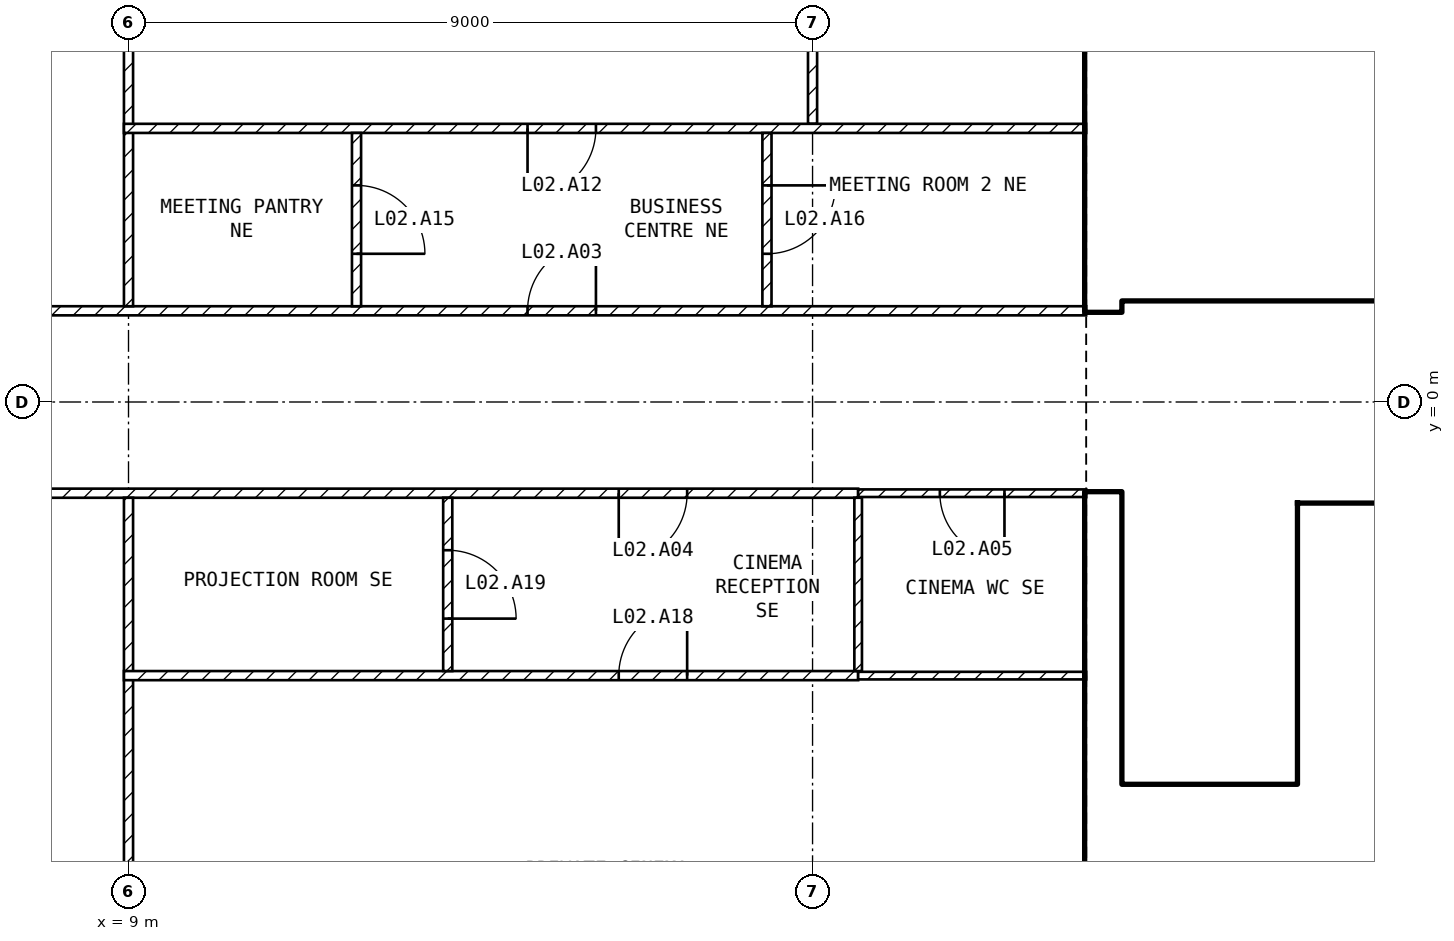
"""IFC4 building model, lengths in metres.
Left out: names, types, materials, properties, quantities, classifications, styles, units other than length and angle.
Written with IfcOpenShell. Run it as: python <this file> out.ifc"""

import sys

from ifc_helpers import new_model, si_unit, direction, frame, frame_2d, origin, place, context, subcontext, project, spatial, rectangle, extrude, element, fill, save


model = new_model("IFC4")
c1 = context("Model", 3, precision=1e-05, world=origin(), true_north=direction((0.0, 1.0)))
c2 = subcontext(c1, "Body", "Model", "MODEL_VIEW")
j1 = project(units=[si_unit("LENGTHUNIT", "METRE"), si_unit("PLANEANGLEUNIT", "RADIAN")], contexts=[c1])
p1 = place(None, origin())
s1 = spatial("IfcSite", under=j1, at=p1, CompositionType="ELEMENT")
p2 = place(p1, origin())
s2 = spatial("IfcBuilding", under=s1, at=p2, CompositionType="ELEMENT")
p3 = place(p2, frame((0.0, 0.0, 21.0)))
s3 = spatial("IfcBuildingStorey", under=s2, at=p3, CompositionType="ELEMENT", Elevation=21.0)
for number, where, z_axis, x_axis in (
    (1, (21.825, -8.1, 0.0), (0.0, 0.0, 1.0), (0.0, 1.0, 0.0)),
    (2, (21.825, 1.2, 0.0), (0.0, 0.0, 1.0), (0.0, 1.0, 0.0)),
):
    element("IfcWall", number, at=place(p3, frame(where, z_axis=z_axis, x_axis=x_axis)), inside=s3, PredefinedType="SHEAR", context=c2, shape_type="SweptSolid", body=[
        extrude(rectangle(XDim=6.9, YDim=0.45, at=frame_2d((3.45, 0.0))), origin(), (0.0, 0.0, 1.0), 5.55),
    ])
p4 = place(p3, frame((22.05, 1.45, 0.0), z_axis=(0.0, 0.0, 1.0), x_axis=(1.0, 0.0, 0.0)))
e3 = element("IfcWall", 3, at=p4, inside=s3, PredefinedType="SOLIDWALL", context=c2, shape_type="SweptSolid", body=[
    extrude(rectangle(XDim=13.05, YDim=0.2, at=frame_2d((6.525, 0.0))), origin(), (0.0, 0.0, 1.0), 5.55),
])
p5 = place(p4, frame((0.75, 0.0, 0.0)))
e4 = element("IfcOpeningElement", 4, at=p5, cuts=e3, PredefinedType="OPENING", context=c2, shape_type="SweptSolid", body=[
    extrude(rectangle(XDim=1.0, YDim=2.1, at=frame_2d((0.5, 1.05))), frame((0.0, 0.11, 0.0), z_axis=(0.0, -1.0, 0.0), x_axis=(1.0, 0.0, 0.0)), (0.0, 0.0, 1.0), 0.22),
])
p6 = place(p4, frame((3.25, 0.0, 0.0)))
e5 = element("IfcOpeningElement", 5, at=p6, cuts=e3, PredefinedType="OPENING", context=c2, shape_type="SweptSolid", body=[
    extrude(rectangle(XDim=1.0, YDim=2.1, at=frame_2d((0.5, 1.05))), frame((0.0, 0.11, 0.0), z_axis=(0.0, -1.0, 0.0), x_axis=(1.0, 0.0, 0.0)), (0.0, 0.0, 1.0), 0.22),
])
p7 = place(p3, frame((24.5, -5.05, 0.0), z_axis=(0.0, 0.0, 1.0), x_axis=(0.0, 1.0, 0.0)))
e6 = element("IfcWall", 6, at=p7, inside=s3, PredefinedType="SOLIDWALL", context=c2, shape_type="SweptSolid", body=[
    extrude(rectangle(XDim=3.7, YDim=0.2, at=frame_2d((1.85, 0.0))), origin(), (0.0, 0.0, 1.0), 5.55),
])
p8 = place(p7, frame((0.1, 0.0, 0.0)))
e7 = element("IfcOpeningElement", 7, at=p8, cuts=e6, PredefinedType="OPENING", context=c2, shape_type="SweptSolid", body=[
    extrude(rectangle(XDim=0.8, YDim=2.1, at=frame_2d((0.4, 1.05))), frame((0.0, 0.11, 0.0), z_axis=(0.0, -1.0, 0.0), x_axis=(1.0, 0.0, 0.0)), (0.0, 0.0, 1.0), 0.22),
])
p9 = place(p3, frame((22.05, -5.15, 0.0), z_axis=(0.0, 0.0, 1.0), x_axis=(1.0, 0.0, 0.0)))
e8 = element("IfcWall", 8, at=p9, inside=s3, PredefinedType="SOLIDWALL", context=c2, shape_type="SweptSolid", body=[
    extrude(rectangle(XDim=6.3, YDim=0.2, at=frame_2d((3.15, 0.0))), origin(), (0.0, 0.0, 1.0), 5.55),
])
p10 = place(p9, frame((0.2, 0.0, 0.0)))
e9 = element("IfcOpeningElement", 9, at=p10, cuts=e8, PredefinedType="OPENING", context=c2, shape_type="SweptSolid", body=[
    extrude(rectangle(XDim=1.0, YDim=2.1, at=frame_2d((0.5, 1.05))), frame((0.0, 0.11, 0.0), z_axis=(0.0, -1.0, 0.0), x_axis=(1.0, 0.0, 0.0)), (0.0, 0.0, 1.0), 0.22),
])
p11 = place(p3, frame((24.6, -1.45, 0.0), z_axis=(0.0, 0.0, 1.0), x_axis=(1.0, 0.0, 0.0)))
e10 = element("IfcWall", 10, at=p11, inside=s3, PredefinedType="SOLIDWALL", context=c2, shape_type="SweptSolid", body=[
    extrude(rectangle(XDim=10.5, YDim=0.2, at=frame_2d((5.25, 0.0))), origin(), (0.0, 0.0, 1.0), 5.55),
])
p12 = place(p11, frame((6.2, 0.0, 0.0)))
e11 = element("IfcOpeningElement", 11, at=p12, cuts=e10, PredefinedType="OPENING", context=c2, shape_type="SweptSolid", body=[
    extrude(rectangle(XDim=1.0, YDim=2.1, at=frame_2d((0.5, 1.05))), frame((0.0, 0.11, 0.0), z_axis=(0.0, -1.0, 0.0), x_axis=(1.0, 0.0, 0.0)), (0.0, 0.0, 1.0), 0.22),
])
p13 = place(p11, frame((7.75, 0.0, 0.0)))
e12 = element("IfcOpeningElement", 12, at=p13, cuts=e10, PredefinedType="OPENING", context=c2, shape_type="SweptSolid", body=[
    extrude(rectangle(XDim=1.0, YDim=2.1, at=frame_2d((0.5, 1.05))), frame((0.0, 0.11, 0.0), z_axis=(0.0, -1.0, 0.0), x_axis=(1.0, 0.0, 0.0)), (0.0, 0.0, 1.0), 0.22),
])
p14 = place(p11, frame((9.3, 0.0, 0.0)))
e13 = element("IfcOpeningElement", 13, at=p14, cuts=e10, PredefinedType="OPENING", context=c2, shape_type="SweptSolid", body=[
    extrude(rectangle(XDim=1.0, YDim=2.1, at=frame_2d((0.5, 1.05))), frame((0.0, 0.11, 0.0), z_axis=(0.0, -1.0, 0.0), x_axis=(1.0, 0.0, 0.0)), (0.0, 0.0, 1.0), 0.22),
])
p15 = place(p11, frame((1.45, 0.0, 0.0)))
e14 = element("IfcOpeningElement", 14, at=p15, cuts=e10, PredefinedType="OPENING", context=c2, shape_type="SweptSolid", body=[
    extrude(rectangle(XDim=0.9, YDim=2.1, at=frame_2d((0.45, 1.05))), frame((0.0, 0.11, 0.0), z_axis=(0.0, -1.0, 0.0), x_axis=(1.0, 0.0, 0.0)), (0.0, 0.0, 1.0), 0.22),
])
p16 = place(p11, frame((4.45, 0.0, 0.0)))
e15 = element("IfcOpeningElement", 15, at=p16, cuts=e10, PredefinedType="OPENING", context=c2, shape_type="SweptSolid", body=[
    extrude(rectangle(XDim=0.9, YDim=2.1, at=frame_2d((0.45, 1.05))), frame((0.0, 0.11, 0.0), z_axis=(0.0, -1.0, 0.0), x_axis=(1.0, 0.0, 0.0)), (0.0, 0.0, 1.0), 0.22),
])
p17 = place(p3, frame((24.6, -3.95, 0.0), z_axis=(0.0, 0.0, 1.0), x_axis=(1.0, 0.0, 0.0)))
e16 = element("IfcWall", 16, at=p17, inside=s3, PredefinedType="SOLIDWALL", context=c2, shape_type="SweptSolid", body=[
    extrude(rectangle(XDim=10.5, YDim=0.2, at=frame_2d((5.25, 0.0))), origin(), (0.0, 0.0, 1.0), 5.55),
])
p18 = place(p3, frame((-13.8, 1.2, 0.0), z_axis=(0.0, 0.0, 1.0), x_axis=(1.0, 0.0, 0.0)))
e17 = element("IfcWall", 17, at=p18, inside=s3, PredefinedType="PARTITIONING", context=c2, shape_type="SweptSolid", body=[
    extrude(rectangle(XDim=35.4, YDim=0.12, at=frame_2d((17.7, 0.0))), origin(), (0.0, 0.0, 1.0), 5.55),
])
p19 = place(p18, frame((12.9, 0.0, 0.0)))
e18 = element("IfcOpeningElement", 18, at=p19, cuts=e17, PredefinedType="OPENING", context=c2, shape_type="SweptSolid", body=[
    extrude(rectangle(XDim=1.8, YDim=2.1, at=frame_2d((0.9, 1.05))), frame((0.0, 0.07, 0.0), z_axis=(0.0, -1.0, 0.0), x_axis=(1.0, 0.0, 0.0)), (0.0, 0.0, 1.0), 0.14),
])
p20 = place(p18, frame((28.05, 0.0, 0.0)))
e19 = element("IfcOpeningElement", 19, at=p20, cuts=e17, PredefinedType="OPENING", context=c2, shape_type="SweptSolid", body=[
    extrude(rectangle(XDim=0.9, YDim=2.1, at=frame_2d((0.45, 1.05))), frame((0.0, 0.07, 0.0), z_axis=(0.0, -1.0, 0.0), x_axis=(1.0, 0.0, 0.0)), (0.0, 0.0, 1.0), 0.14),
])
p21 = place(p18, frame((1.95, 0.0, 0.0)))
e20 = element("IfcOpeningElement", 20, at=p21, cuts=e17, PredefinedType="OPENING", context=c2, shape_type="SweptSolid", body=[
    extrude(rectangle(XDim=0.9, YDim=2.1, at=frame_2d((0.45, 1.05))), frame((0.0, 0.07, 0.0), z_axis=(0.0, -1.0, 0.0), x_axis=(1.0, 0.0, 0.0)), (0.0, 0.0, 1.0), 0.14),
])
p22 = place(p3, frame((18.6, -1.2, 0.0), z_axis=(0.0, 0.0, 1.0), x_axis=(-1.0, 0.0, 0.0)))
e21 = element("IfcWall", 21, at=p22, inside=s3, PredefinedType="PARTITIONING", context=c2, shape_type="SweptSolid", body=[
    extrude(rectangle(XDim=33.0, YDim=0.12, at=frame_2d((16.5, 0.0))), origin(), (0.0, 0.0, 1.0), 5.55),
])
p23 = place(p22, frame((17.7, 0.0, 0.0)))
e22 = element("IfcOpeningElement", 22, at=p23, cuts=e21, PredefinedType="OPENING", context=c2, shape_type="SweptSolid", body=[
    extrude(rectangle(XDim=1.8, YDim=2.1, at=frame_2d((0.9, 1.05))), frame((0.0, 0.07, 0.0), z_axis=(0.0, -1.0, 0.0), x_axis=(1.0, 0.0, 0.0)), (0.0, 0.0, 1.0), 0.14),
])
p24 = place(p22, frame((2.25, 0.0, 0.0)))
e23 = element("IfcOpeningElement", 23, at=p24, cuts=e21, PredefinedType="OPENING", context=c2, shape_type="SweptSolid", body=[
    extrude(rectangle(XDim=0.9, YDim=2.1, at=frame_2d((0.45, 1.05))), frame((0.0, 0.07, 0.0), z_axis=(0.0, -1.0, 0.0), x_axis=(1.0, 0.0, 0.0)), (0.0, 0.0, 1.0), 0.14),
])
p25 = place(p22, frame((28.65, 0.0, 0.0)))
e24 = element("IfcOpeningElement", 24, at=p25, cuts=e21, PredefinedType="OPENING", context=c2, shape_type="SweptSolid", body=[
    extrude(rectangle(XDim=0.9, YDim=2.1, at=frame_2d((0.45, 1.05))), frame((0.0, 0.07, 0.0), z_axis=(0.0, -1.0, 0.0), x_axis=(1.0, 0.0, 0.0)), (0.0, 0.0, 1.0), 0.14),
])
p26 = place(p3, frame((21.6, -1.2, 0.0), z_axis=(0.0, 0.0, 1.0), x_axis=(-1.0, 0.0, 0.0)))
e25 = element("IfcWall", 25, at=p26, inside=s3, PredefinedType="PARTITIONING", context=c2, shape_type="SweptSolid", body=[
    extrude(rectangle(XDim=3.0, YDim=0.1, at=frame_2d((1.5, 0.0))), origin(), (0.0, 0.0, 1.0), 5.55),
])
p27 = place(p26, frame((1.075, 0.0, 0.0)))
e26 = element("IfcOpeningElement", 26, at=p27, cuts=e25, PredefinedType="OPENING", context=c2, shape_type="SweptSolid", body=[
    extrude(rectangle(XDim=0.85, YDim=2.1, at=frame_2d((0.425, 1.05))), frame((0.0, 0.06, 0.0), z_axis=(0.0, -1.0, 0.0), x_axis=(1.0, 0.0, 0.0)), (0.0, 0.0, 1.0), 0.12),
])
for number, where, z_axis, x_axis in (
    (27, (9.0, 8.92, 0.0), (0.0, 0.0, 1.0), (0.0, -1.0, 0.0)),
    (28, (9.0, -1.26, 0.0), (0.0, 0.0, 1.0), (0.0, -1.0, 0.0)),
):
    element("IfcWall", number, at=place(p3, frame(where, z_axis=z_axis, x_axis=x_axis)), inside=s3, PredefinedType="PARTITIONING", context=c2, shape_type="SweptSolid", body=[
        extrude(rectangle(XDim=7.66, YDim=0.12, at=frame_2d((3.83, 0.0))), origin(), (0.0, 0.0, 1.0), 5.55),
    ])
p28 = place(p3, frame((18.0, 7.35, 0.0), z_axis=(0.0, 0.0, 1.0), x_axis=(0.0, -1.0, 0.0)))
e29 = element("IfcWall", 29, at=p28, inside=s3, PredefinedType="PARTITIONING", context=c2, shape_type="SweptSolid", body=[
    extrude(rectangle(XDim=3.69, YDim=0.12, at=frame_2d((1.845, 0.0))), origin(), (0.0, 0.0, 1.0), 4.57),
])
p29 = place(p28, frame((1.395, 0.0, 0.0)))
e30 = element("IfcOpeningElement", 30, at=p29, cuts=e29, PredefinedType="OPENING", context=c2, shape_type="SweptSolid", body=[
    extrude(rectangle(XDim=0.9, YDim=2.1, at=frame_2d((0.45, 1.05))), frame((0.0, 0.07, 0.0), z_axis=(0.0, -1.0, 0.0), x_axis=(1.0, 0.0, 0.0)), (0.0, 0.0, 1.0), 0.14),
])
p30 = place(p3, frame((21.6, 3.6, 0.0), z_axis=(0.0, 0.0, 1.0), x_axis=(-1.0, 0.0, 0.0)))
e31 = element("IfcWall", 31, at=p30, inside=s3, PredefinedType="PARTITIONING", context=c2, shape_type="SweptSolid", body=[
    extrude(rectangle(XDim=12.66, YDim=0.12, at=frame_2d((6.33, 0.0))), origin(), (0.0, 0.0, 1.0), 5.55),
])
p31 = place(p30, frame((6.45, 0.0, 0.0)))
e32 = element("IfcOpeningElement", 32, at=p31, cuts=e31, PredefinedType="OPENING", context=c2, shape_type="SweptSolid", body=[
    extrude(rectangle(XDim=0.9, YDim=2.1, at=frame_2d((0.45, 1.05))), frame((0.0, 0.07, 0.0), z_axis=(0.0, -1.0, 0.0), x_axis=(1.0, 0.0, 0.0)), (0.0, 0.0, 1.0), 0.14),
])
p32 = place(p3, frame((12.0, 3.54, 0.0), z_axis=(0.0, 0.0, 1.0), x_axis=(0.0, -1.0, 0.0)))
e33 = element("IfcWall", 33, at=p32, inside=s3, PredefinedType="PARTITIONING", context=c2, shape_type="SweptSolid", body=[
    extrude(rectangle(XDim=2.28, YDim=0.12, at=frame_2d((1.14, 0.0))), origin(), (0.0, 0.0, 1.0), 5.55),
])
p33 = place(p32, frame((0.69, 0.0, 0.0)))
e34 = element("IfcOpeningElement", 34, at=p33, cuts=e33, PredefinedType="OPENING", context=c2, shape_type="SweptSolid", body=[
    extrude(rectangle(XDim=0.9, YDim=2.1, at=frame_2d((0.45, 1.05))), frame((0.0, 0.07, 0.0), z_axis=(0.0, -1.0, 0.0), x_axis=(1.0, 0.0, 0.0)), (0.0, 0.0, 1.0), 0.14),
])
p34 = place(p3, frame((17.4, 3.54, 0.0), z_axis=(0.0, 0.0, 1.0), x_axis=(0.0, -1.0, 0.0)))
e35 = element("IfcWall", 35, at=p34, inside=s3, PredefinedType="PARTITIONING", context=c2, shape_type="SweptSolid", body=[
    extrude(rectangle(XDim=2.28, YDim=0.12, at=frame_2d((1.14, 0.0))), origin(), (0.0, 0.0, 1.0), 5.55),
])
p35 = place(p34, frame((0.69, 0.0, 0.0)))
e36 = element("IfcOpeningElement", 36, at=p35, cuts=e35, PredefinedType="OPENING", context=c2, shape_type="SweptSolid", body=[
    extrude(rectangle(XDim=0.9, YDim=2.1, at=frame_2d((0.45, 1.05))), frame((0.0, 0.07, 0.0), z_axis=(0.0, -1.0, 0.0), x_axis=(1.0, 0.0, 0.0)), (0.0, 0.0, 1.0), 0.14),
])
p36 = place(p3, frame((8.94, -3.6, 0.0), z_axis=(0.0, 0.0, 1.0), x_axis=(1.0, 0.0, 0.0)))
e37 = element("IfcWall", 37, at=p36, inside=s3, PredefinedType="PARTITIONING", context=c2, shape_type="SweptSolid", body=[
    extrude(rectangle(XDim=9.66, YDim=0.12, at=frame_2d((4.83, 0.0))), origin(), (0.0, 0.0, 1.0), 5.55),
])
p37 = place(p36, frame((6.51, 0.0, 0.0)))
e38 = element("IfcOpeningElement", 38, at=p37, cuts=e37, PredefinedType="OPENING", context=c2, shape_type="SweptSolid", body=[
    extrude(rectangle(XDim=0.9, YDim=2.1, at=frame_2d((0.45, 1.05))), frame((0.0, 0.07, 0.0), z_axis=(0.0, -1.0, 0.0), x_axis=(1.0, 0.0, 0.0)), (0.0, 0.0, 1.0), 0.14),
])
p38 = place(p3, frame((18.6, -3.6, 0.0), z_axis=(0.0, 0.0, 1.0), x_axis=(1.0, 0.0, 0.0)))
e39 = element("IfcWall", 39, at=p38, inside=s3, PredefinedType="PARTITIONING", context=c2, shape_type="SweptSolid", body=[
    extrude(rectangle(XDim=3.0, YDim=0.1, at=frame_2d((1.5, 0.0))), origin(), (0.0, 0.0, 1.0), 5.55),
])
p39 = place(p3, frame((13.2, -1.26, 0.0), z_axis=(0.0, 0.0, 1.0), x_axis=(0.0, -1.0, 0.0)))
e40 = element("IfcWall", 40, at=p39, inside=s3, PredefinedType="PARTITIONING", context=c2, shape_type="SweptSolid", body=[
    extrude(rectangle(XDim=2.28, YDim=0.12, at=frame_2d((1.14, 0.0))), origin(), (0.0, 0.0, 1.0), 4.857),
])
p40 = place(p39, frame((0.69, 0.0, 0.0)))
e41 = element("IfcOpeningElement", 41, at=p40, cuts=e40, PredefinedType="OPENING", context=c2, shape_type="SweptSolid", body=[
    extrude(rectangle(XDim=0.9, YDim=2.1, at=frame_2d((0.45, 1.05))), frame((0.0, 0.07, 0.0), z_axis=(0.0, -1.0, 0.0), x_axis=(1.0, 0.0, 0.0)), (0.0, 0.0, 1.0), 0.14),
])
p41 = place(p3, frame((18.6, -1.26, 0.0), z_axis=(0.0, 0.0, 1.0), x_axis=(0.0, -1.0, 0.0)))
e42 = element("IfcWall", 42, at=p41, inside=s3, PredefinedType="PARTITIONING", context=c2, shape_type="SweptSolid", body=[
    extrude(rectangle(XDim=2.28, YDim=0.1, at=frame_2d((1.14, 0.0))), origin(), (0.0, 0.0, 1.0), 5.55),
])
p42 = place(p10, origin())
e43 = element("IfcDoor", 43, at=p42, inside=s3, OperationType="SINGLE_SWING_LEFT", PredefinedType="DOOR", context=c2, shape_type="SweptSolid", body=[
    extrude(rectangle(XDim=1.0, YDim=2.1, at=frame_2d((0.5, 1.05))), frame((0.0, 0.025, 0.0), z_axis=(0.0, -1.0, 0.0), x_axis=(1.0, 0.0, 0.0)), (0.0, 0.0, 1.0), 0.05),
])
fill(e9, e43)
p43 = place(p5, origin())
e44 = element("IfcDoor", 44, at=p43, inside=s3, OperationType="SINGLE_SWING_LEFT", PredefinedType="DOOR", context=c2, shape_type="SweptSolid", body=[
    extrude(rectangle(XDim=1.0, YDim=2.1, at=frame_2d((0.5, 1.05))), frame((0.0, 0.025, 0.0), z_axis=(0.0, -1.0, 0.0), x_axis=(1.0, 0.0, 0.0)), (0.0, 0.0, 1.0), 0.05),
])
fill(e4, e44)
p44 = place(p8, origin())
e45 = element("IfcDoor", 45, at=p44, inside=s3, OperationType="SINGLE_SWING_LEFT", PredefinedType="DOOR", context=c2, shape_type="SweptSolid", body=[
    extrude(rectangle(XDim=0.8, YDim=2.1, at=frame_2d((0.4, 1.05))), frame((0.0, 0.025, 0.0), z_axis=(0.0, -1.0, 0.0), x_axis=(1.0, 0.0, 0.0)), (0.0, 0.0, 1.0), 0.05),
])
fill(e7, e45)
p45 = place(p6, origin())
e46 = element("IfcDoor", 46, at=p45, inside=s3, OperationType="SINGLE_SWING_LEFT", PredefinedType="DOOR", context=c2, shape_type="SweptSolid", body=[
    extrude(rectangle(XDim=1.0, YDim=2.1, at=frame_2d((0.5, 1.05))), frame((0.0, 0.025, 0.0), z_axis=(0.0, -1.0, 0.0), x_axis=(1.0, 0.0, 0.0)), (0.0, 0.0, 1.0), 0.05),
])
fill(e5, e46)
p46 = place(p20, origin())
e47 = element("IfcDoor", 47, at=p46, inside=s3, OperationType="SINGLE_SWING_RIGHT", PredefinedType="DOOR", context=c2, shape_type="SweptSolid", body=[
    extrude(rectangle(XDim=0.9, YDim=2.1, at=frame_2d((0.45, 1.05))), frame((0.0, 0.025, 0.0), z_axis=(0.0, -1.0, 0.0), x_axis=(1.0, 0.0, 0.0)), (0.0, 0.0, 1.0), 0.05),
])
fill(e19, e47)
p47 = place(p24, origin())
e48 = element("IfcDoor", 48, at=p47, inside=s3, OperationType="SINGLE_SWING_RIGHT", PredefinedType="DOOR", context=c2, shape_type="SweptSolid", body=[
    extrude(rectangle(XDim=0.9, YDim=2.1, at=frame_2d((0.45, 1.05))), frame((0.0, 0.025, 0.0), z_axis=(0.0, -1.0, 0.0), x_axis=(1.0, 0.0, 0.0)), (0.0, 0.0, 1.0), 0.05),
])
fill(e23, e48)
p48 = place(p27, origin())
e49 = element("IfcDoor", 49, at=p48, inside=s3, OperationType="SINGLE_SWING_LEFT", PredefinedType="DOOR", context=c2, shape_type="SweptSolid", body=[
    extrude(rectangle(XDim=0.85, YDim=2.1, at=frame_2d((0.425, 1.05))), frame((0.0, 0.025, 0.0), z_axis=(0.0, -1.0, 0.0), x_axis=(1.0, 0.0, 0.0)), (0.0, 0.0, 1.0), 0.05),
])
fill(e26, e49)
p49 = place(p31, origin())
e50 = element("IfcDoor", 50, at=p49, inside=s3, OperationType="SINGLE_SWING_RIGHT", PredefinedType="DOOR", context=c2, shape_type="SweptSolid", body=[
    extrude(rectangle(XDim=0.9, YDim=2.1, at=frame_2d((0.45, 1.05))), frame((0.0, 0.025, 0.0), z_axis=(0.0, -1.0, 0.0), x_axis=(1.0, 0.0, 0.0)), (0.0, 0.0, 1.0), 0.05),
])
fill(e32, e50)
p50 = place(p33, origin())
e51 = element("IfcDoor", 51, at=p50, inside=s3, OperationType="SINGLE_SWING_RIGHT", PredefinedType="DOOR", context=c2, shape_type="SweptSolid", body=[
    extrude(rectangle(XDim=0.9, YDim=2.1, at=frame_2d((0.45, 1.05))), frame((0.0, 0.025, 0.0), z_axis=(0.0, -1.0, 0.0), x_axis=(1.0, 0.0, 0.0)), (0.0, 0.0, 1.0), 0.05),
])
fill(e34, e51)
p51 = place(p35, origin())
e52 = element("IfcDoor", 52, at=p51, inside=s3, OperationType="SINGLE_SWING_LEFT", PredefinedType="DOOR", context=c2, shape_type="SweptSolid", body=[
    extrude(rectangle(XDim=0.9, YDim=2.1, at=frame_2d((0.45, 1.05))), frame((0.0, 0.025, 0.0), z_axis=(0.0, -1.0, 0.0), x_axis=(1.0, 0.0, 0.0)), (0.0, 0.0, 1.0), 0.05),
])
fill(e36, e52)
p52 = place(p37, origin())
e53 = element("IfcDoor", 53, at=p52, inside=s3, OperationType="SINGLE_SWING_RIGHT", PredefinedType="DOOR", context=c2, shape_type="SweptSolid", body=[
    extrude(rectangle(XDim=0.9, YDim=2.1, at=frame_2d((0.45, 1.05))), frame((0.0, 0.025, 0.0), z_axis=(0.0, -1.0, 0.0), x_axis=(1.0, 0.0, 0.0)), (0.0, 0.0, 1.0), 0.05),
])
fill(e38, e53)
p53 = place(p40, origin())
e54 = element("IfcDoor", 54, at=p53, inside=s3, OperationType="SINGLE_SWING_RIGHT", PredefinedType="DOOR", context=c2, shape_type="SweptSolid", body=[
    extrude(rectangle(XDim=0.9, YDim=2.1, at=frame_2d((0.45, 1.05))), frame((0.0, 0.025, 0.0), z_axis=(0.0, -1.0, 0.0), x_axis=(1.0, 0.0, 0.0)), (0.0, 0.0, 1.0), 0.05),
])
fill(e41, e54)
save(model, sys.argv[1])
